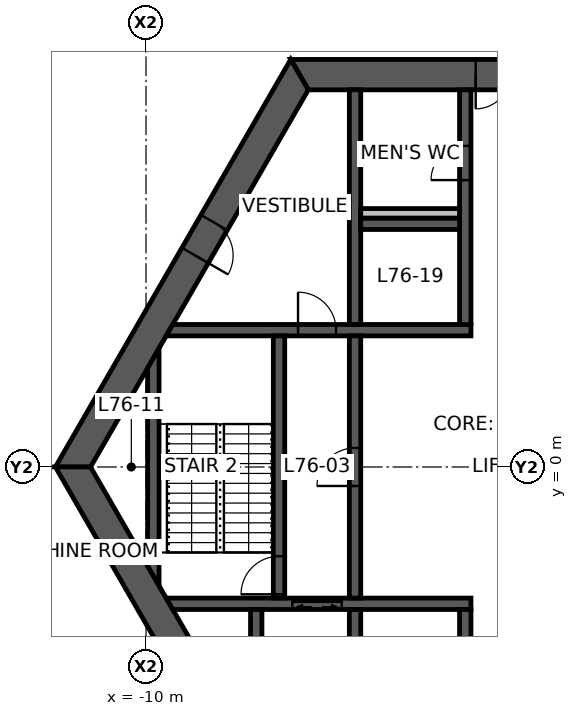
"""IFC4 building model, lengths in metres.
Left out: names, types, materials, properties, quantities, classifications, styles, units other than length and angle.
Written with IfcOpenShell. Run it as: python <this file> out.ifc"""

import sys

from ifc_helpers import new_model, si_unit, direction, frame, frame_2d, origin, place, context, subcontext, project, spatial, polyline, rectangle, outline, extrude, element, fill, save


model = new_model("IFC4")
c1 = context("Model", 3, precision=1e-05, world=origin(), true_north=direction((0.0, 1.0)))
c2 = subcontext(c1, "Body", "Model", "MODEL_VIEW")
j1 = project(units=[si_unit("LENGTHUNIT", "METRE"), si_unit("PLANEANGLEUNIT", "RADIAN")], contexts=[c1])
p1 = place(None, origin())
s1 = spatial("IfcSite", under=j1, at=p1, CompositionType="ELEMENT")
p2 = place(p1, origin())
s2 = spatial("IfcBuilding", under=s1, at=p2, CompositionType="ELEMENT")
p3 = place(p2, frame((0.0, 0.0, 302.5)))
s3 = spatial("IfcBuildingStorey", under=s2, at=p3, CompositionType="ELEMENT", Elevation=302.5)
p4 = place(p3, frame((5.961, 10.325, 0.0), z_axis=(0.0, 0.0, 1.0), x_axis=(-1.0, 0.0, 0.0)))
e1 = element("IfcWall", 1, at=p4, inside=s3, PredefinedType="SHEAR", context=c2, shape_type="SweptSolid", body=[
    extrude(outline(polyline([(-0.231, -0.4), (4.636, -0.4), (5.536, -0.4), (6.386, -0.4), (7.286, -0.4), (12.153, -0.4), (11.691, 0.4), (7.286, 0.4), (6.386, 0.4), (5.536, 0.4), (4.636, 0.4), (0.231, 0.4), (-0.231, -0.4)])), origin(), (0.0, 0.0, 1.0), 5.0),
])
p5 = place(p4, frame((6.386, 0.0, 0.0)))
e2 = element("IfcOpeningElement", 2, at=p5, cuts=e1, PredefinedType="OPENING", context=c2, shape_type="SweptSolid", body=[
    extrude(rectangle(XDim=0.9, YDim=2.1, at=frame_2d((0.45, 1.05))), frame((0.0, 0.41, 0.0), z_axis=(0.0, -1.0, 0.0), x_axis=(1.0, 0.0, 0.0)), (0.0, 0.0, 1.0), 0.82),
])
p6 = place(p4, frame((4.636, 0.0, 0.0)))
e3 = element("IfcOpeningElement", 3, at=p6, cuts=e1, PredefinedType="OPENING", context=c2, shape_type="SweptSolid", body=[
    extrude(rectangle(XDim=0.9, YDim=2.1, at=frame_2d((0.45, 1.05))), frame((0.0, 0.41, 0.0), z_axis=(0.0, -1.0, 0.0), x_axis=(1.0, 0.0, 0.0)), (0.0, 0.0, 1.0), 0.82),
])
p7 = place(p3, frame((-5.961, 10.325, 0.0), z_axis=(0.0, 0.0, 1.0), x_axis=(-0.500004296715, -0.866022923061, 0.0)))
e4 = element("IfcWall", 4, at=p7, inside=s3, PredefinedType="SHEAR", context=c2, shape_type="SweptSolid", body=[
    extrude(outline(polyline([(-0.231, -0.4), (4.494, -0.4), (5.494, -0.4), (12.153, -0.4), (11.691, 0.4), (5.494, 0.4), (4.494, 0.4), (0.231, 0.4), (-0.231, -0.4)])), origin(), (0.0, 0.0, 1.0), 5.0),
])
p8 = place(p7, frame((4.494, 0.0, 0.0)))
e5 = element("IfcOpeningElement", 5, at=p8, cuts=e4, PredefinedType="OPENING", context=c2, shape_type="SweptSolid", body=[
    extrude(rectangle(XDim=1.0, YDim=2.1, at=frame_2d((0.5, 1.05))), frame((0.0, 0.41, 0.0), z_axis=(0.0, -1.0, 0.0), x_axis=(1.0, 0.0, 0.0)), (0.0, 0.0, 1.0), 0.82),
])
p9 = place(p3, frame((-11.922, 0.0, 0.0), z_axis=(0.0, 0.0, 1.0), x_axis=(0.500004296715, -0.866022923061, 0.0)))
e6 = element("IfcWall", 6, at=p9, inside=s3, PredefinedType="SHEAR", context=c2, shape_type="SweptSolid", body=[
    extrude(outline(polyline([(-0.231, -0.4), (6.281, -0.4), (7.081, -0.4), (12.153, -0.4), (11.691, 0.4), (7.081, 0.4), (6.281, 0.4), (0.231, 0.4), (-0.231, -0.4)])), origin(), (0.0, 0.0, 1.0), 5.0),
])
p10 = place(p9, frame((6.281, 0.0, 0.0)))
e7 = element("IfcOpeningElement", 7, at=p10, cuts=e6, PredefinedType="OPENING", context=c2, shape_type="SweptSolid", body=[
    extrude(rectangle(XDim=0.8, YDim=2.1, at=frame_2d((0.4, 1.05))), frame((0.0, 0.41, 0.0), z_axis=(0.0, -1.0, 0.0), x_axis=(1.0, 0.0, 0.0)), (0.0, 0.0, 1.0), 0.82),
])
p11 = place(p3, frame((-10.396, 17.834, 0.0), z_axis=(0.0, 0.0, 1.0), x_axis=(-0.499997112899, -0.866027070647, 0.0)))
e8 = element("IfcWall", 8, at=p11, inside=s3, PredefinedType="ELEMENTEDWALL", context=c2, shape_type="SweptSolid", body=[
    extrude(rectangle(XDim=20.493, YDim=0.2, at=frame_2d((10.246, 0.0))), origin(), (0.0, 0.0, 1.0), 5.0),
])
p12 = place(p11, frame((0.9, 0.0, 0.4)))
e9 = element("IfcOpeningElement", 9, at=p12, cuts=e8, PredefinedType="OPENING", context=c2, shape_type="SweptSolid", body=[
    extrude(rectangle(XDim=2.615, YDim=4.2, at=frame_2d((1.308, 2.1))), frame((0.0, 0.11, 0.0), z_axis=(0.0, -1.0, 0.0), x_axis=(1.0, 0.0, 0.0)), (0.0, 0.0, 1.0), 0.22),
])
p13 = place(p11, frame((4.115, 0.0, 0.4)))
e10 = element("IfcOpeningElement", 10, at=p13, cuts=e8, PredefinedType="OPENING", context=c2, shape_type="SweptSolid", body=[
    extrude(rectangle(XDim=2.615, YDim=4.2, at=frame_2d((1.308, 2.1))), frame((0.0, 0.11, 0.0), z_axis=(0.0, -1.0, 0.0), x_axis=(1.0, 0.0, 0.0)), (0.0, 0.0, 1.0), 0.22),
])
p14 = place(p11, frame((13.762, 0.0, 0.4)))
e11 = element("IfcOpeningElement", 11, at=p14, cuts=e8, PredefinedType="OPENING", context=c2, shape_type="SweptSolid", body=[
    extrude(rectangle(XDim=2.615, YDim=4.2, at=frame_2d((1.308, 2.1))), frame((0.0, 0.11, 0.0), z_axis=(0.0, -1.0, 0.0), x_axis=(1.0, 0.0, 0.0)), (0.0, 0.0, 1.0), 0.22),
])
p15 = place(p11, frame((16.977, 0.0, 0.4)))
e12 = element("IfcOpeningElement", 12, at=p15, cuts=e8, PredefinedType="OPENING", context=c2, shape_type="SweptSolid", body=[
    extrude(rectangle(XDim=2.615, YDim=4.2, at=frame_2d((1.308, 2.1))), frame((0.0, 0.11, 0.0), z_axis=(0.0, -1.0, 0.0), x_axis=(1.0, 0.0, 0.0)), (0.0, 0.0, 1.0), 0.22),
])
p16 = place(p3, frame((-20.643, -0.087, 0.0), z_axis=(0.0, 0.0, 1.0), x_axis=(0.499997112899, -0.866027070647, 0.0)))
e13 = element("IfcWall", 13, at=p16, inside=s3, PredefinedType="ELEMENTEDWALL", context=c2, shape_type="SweptSolid", body=[
    extrude(rectangle(XDim=20.493, YDim=0.2, at=frame_2d((10.246, 0.0))), origin(), (0.0, 0.0, 1.0), 5.0),
])
p17 = place(p16, frame((0.9, 0.0, 0.4)))
e14 = element("IfcOpeningElement", 14, at=p17, cuts=e13, PredefinedType="OPENING", context=c2, shape_type="SweptSolid", body=[
    extrude(rectangle(XDim=2.615, YDim=4.2, at=frame_2d((1.308, 2.1))), frame((0.0, 0.11, 0.0), z_axis=(0.0, -1.0, 0.0), x_axis=(1.0, 0.0, 0.0)), (0.0, 0.0, 1.0), 0.22),
])
p18 = place(p16, frame((4.115, 0.0, 0.4)))
e15 = element("IfcOpeningElement", 15, at=p18, cuts=e13, PredefinedType="OPENING", context=c2, shape_type="SweptSolid", body=[
    extrude(rectangle(XDim=2.615, YDim=4.2, at=frame_2d((1.308, 2.1))), frame((0.0, 0.11, 0.0), z_axis=(0.0, -1.0, 0.0), x_axis=(1.0, 0.0, 0.0)), (0.0, 0.0, 1.0), 0.22),
])
p19 = place(p16, frame((7.331, 0.0, 0.4)))
e16 = element("IfcOpeningElement", 16, at=p19, cuts=e13, PredefinedType="OPENING", context=c2, shape_type="SweptSolid", body=[
    extrude(rectangle(XDim=2.615, YDim=4.2, at=frame_2d((1.308, 2.1))), frame((0.0, 0.11, 0.0), z_axis=(0.0, -1.0, 0.0), x_axis=(1.0, 0.0, 0.0)), (0.0, 0.0, 1.0), 0.22),
])
p20 = place(p16, frame((10.546, 0.0, 0.4)))
e17 = element("IfcOpeningElement", 17, at=p20, cuts=e13, PredefinedType="OPENING", context=c2, shape_type="SweptSolid", body=[
    extrude(rectangle(XDim=2.615, YDim=4.2, at=frame_2d((1.308, 2.1))), frame((0.0, 0.11, 0.0), z_axis=(0.0, -1.0, 0.0), x_axis=(1.0, 0.0, 0.0)), (0.0, 0.0, 1.0), 0.22),
])
p21 = place(p16, frame((13.762, 0.0, 0.4)))
e18 = element("IfcOpeningElement", 18, at=p21, cuts=e13, PredefinedType="OPENING", context=c2, shape_type="SweptSolid", body=[
    extrude(rectangle(XDim=2.615, YDim=4.2, at=frame_2d((1.308, 2.1))), frame((0.0, 0.11, 0.0), z_axis=(0.0, -1.0, 0.0), x_axis=(1.0, 0.0, 0.0)), (0.0, 0.0, 1.0), 0.22),
])
p22 = place(p16, frame((16.977, 0.0, 0.4)))
e19 = element("IfcOpeningElement", 19, at=p22, cuts=e13, PredefinedType="OPENING", context=c2, shape_type="SweptSolid", body=[
    extrude(rectangle(XDim=2.615, YDim=4.2, at=frame_2d((1.308, 2.1))), frame((0.0, 0.11, 0.0), z_axis=(0.0, -1.0, 0.0), x_axis=(1.0, 0.0, 0.0)), (0.0, 0.0, 1.0), 0.22),
])
p23 = place(p3, frame((-9.382, 3.6, 0.0), z_axis=(0.0, 0.0, 1.0), x_axis=(1.0, 0.0, 0.0)))
e20 = element("IfcWall", 20, at=p23, inside=s3, PredefinedType="SHEAR", context=c2, shape_type="SweptSolid", body=[
    extrude(outline(polyline([(-0.087, -0.15), (3.382, -0.15), (4.382, -0.15), (7.932, -0.15), (7.932, 0.15), (4.382, 0.15), (3.382, 0.15), (0.087, 0.15), (-0.087, -0.15)])), origin(), (0.0, 0.0, 1.0), 5.0),
])
p24 = place(p23, frame((3.382, 0.0, 0.0)))
e21 = element("IfcOpeningElement", 21, at=p24, cuts=e20, PredefinedType="OPENING", context=c2, shape_type="SweptSolid", body=[
    extrude(rectangle(XDim=1.0, YDim=2.1, at=frame_2d((0.5, 1.05))), frame((0.0, 0.16, 0.0), z_axis=(0.0, -1.0, 0.0), x_axis=(1.0, 0.0, 0.0)), (0.0, 0.0, 1.0), 0.32),
])
p25 = place(p3, frame((-9.382, -3.6, 0.0), z_axis=(0.0, 0.0, 1.0), x_axis=(1.0, 0.0, 0.0)))
e22 = element("IfcWall", 22, at=p25, inside=s3, PredefinedType="SHEAR", context=c2, shape_type="SweptSolid", body=[
    extrude(outline(polyline([(0.087, -0.15), (3.232, -0.15), (4.532, -0.15), (7.932, -0.15), (7.932, 0.15), (4.532, 0.15), (3.232, 0.15), (-0.087, 0.15), (0.087, -0.15)])), origin(), (0.0, 0.0, 1.0), 5.0),
])
p26 = place(p25, frame((3.232, 0.0, 0.0)))
e23 = element("IfcOpeningElement", 23, at=p26, cuts=e22, PredefinedType="OPENING", context=c2, shape_type="SweptSolid", body=[
    extrude(rectangle(XDim=1.3, YDim=2.1, at=frame_2d((0.65, 1.05))), frame((0.0, 0.16, 0.0), z_axis=(0.0, -1.0, 0.0), x_axis=(1.0, 0.0, 0.0)), (0.0, 0.0, 1.0), 0.32),
])
p27 = place(p3, frame((-1.6, 3.75, 0.0), z_axis=(0.0, 0.0, 1.0), x_axis=(0.0, 1.0, 0.0)))
e24 = element("IfcWall", 24, at=p27, inside=s3, PredefinedType="SHEAR", context=c2, shape_type="SweptSolid", body=[
    extrude(rectangle(XDim=6.175, YDim=0.3, at=frame_2d((3.087, 0.0))), origin(), (0.0, 0.0, 1.0), 5.0),
])
p28 = place(p27, frame((3.8, 0.0, 0.0)))
e25 = element("IfcOpeningElement", 25, at=p28, cuts=e24, PredefinedType="OPENING", context=c2, shape_type="SweptSolid", body=[
    extrude(rectangle(XDim=0.9, YDim=2.1, at=frame_2d((0.45, 1.05))), frame((0.0, 0.16, 0.0), z_axis=(0.0, -1.0, 0.0), x_axis=(1.0, 0.0, 0.0)), (0.0, 0.0, 1.0), 0.32),
])
p29 = place(p3, frame((-1.6, -3.75, 0.0), z_axis=(0.0, 0.0, 1.0), x_axis=(0.0, -1.0, 0.0)))
e26 = element("IfcWall", 26, at=p29, inside=s3, PredefinedType="SHEAR", context=c2, shape_type="SweptSolid", body=[
    extrude(rectangle(XDim=6.175, YDim=0.3, at=frame_2d((3.087, 0.0))), origin(), (0.0, 0.0, 1.0), 5.0),
])
p30 = place(p29, frame((3.8, 0.0, 0.0)))
e27 = element("IfcOpeningElement", 27, at=p30, cuts=e26, PredefinedType="OPENING", context=c2, shape_type="SweptSolid", body=[
    extrude(rectangle(XDim=0.9, YDim=2.1, at=frame_2d((0.45, 1.05))), frame((0.0, 0.16, 0.0), z_axis=(0.0, -1.0, 0.0), x_axis=(1.0, 0.0, 0.0)), (0.0, 0.0, 1.0), 0.32),
])
p31 = place(p3, frame((-4.5, -3.45, 0.0), z_axis=(0.0, 0.0, 1.0), x_axis=(0.0, 1.0, 0.0)))
e28 = element("IfcWall", 28, at=p31, inside=s3, PredefinedType="SHEAR", context=c2, shape_type="SweptSolid", body=[
    extrude(rectangle(XDim=6.9, YDim=0.3, at=frame_2d((3.45, 0.0))), origin(), (0.0, 0.0, 1.0), 5.0),
])
p32 = place(p31, frame((2.95, 0.0, 0.0)))
e29 = element("IfcOpeningElement", 29, at=p32, cuts=e28, PredefinedType="OPENING", context=c2, shape_type="SweptSolid", body=[
    extrude(rectangle(XDim=1.0, YDim=2.1, at=frame_2d((0.5, 1.05))), frame((0.0, 0.16, 0.0), z_axis=(0.0, -1.0, 0.0), x_axis=(1.0, 0.0, 0.0)), (0.0, 0.0, 1.0), 0.32),
])
p33 = place(p3, frame((-6.5, -3.45, 0.0), z_axis=(0.0, 0.0, 1.0), x_axis=(0.0, 1.0, 0.0)))
e30 = element("IfcWall", 30, at=p33, inside=s3, PredefinedType="SHEAR", context=c2, shape_type="SweptSolid", body=[
    extrude(rectangle(XDim=6.9, YDim=0.3, at=frame_2d((3.45, 0.0))), origin(), (0.0, 0.0, 1.0), 5.0),
])
p34 = place(p33, frame((0.1, 0.0, 0.0)))
e31 = element("IfcOpeningElement", 31, at=p34, cuts=e30, PredefinedType="OPENING", context=c2, shape_type="SweptSolid", body=[
    extrude(rectangle(XDim=1.0, YDim=2.1, at=frame_2d((0.5, 1.05))), frame((0.0, 0.16, 0.0), z_axis=(0.0, -1.0, 0.0), x_axis=(1.0, 0.0, 0.0)), (0.0, 0.0, 1.0), 0.32),
])
for number, where, z_axis, x_axis in (
    (32, (-4.5, 3.75, 0.0), (0.0, 0.0, 1.0), (0.0, 1.0, 0.0)),
    (33, (-4.5, -3.75, 0.0), (0.0, 0.0, 1.0), (0.0, -1.0, 0.0)),
):
    element("IfcWall", number, at=place(p3, frame(where, z_axis=z_axis, x_axis=x_axis)), inside=s3, PredefinedType="SHEAR", context=c2, shape_type="SweptSolid", body=[
        extrude(rectangle(XDim=6.175, YDim=0.3, at=frame_2d((3.087, 0.0))), origin(), (0.0, 0.0, 1.0), 5.0),
    ])
p35 = place(p3, frame((-4.35, 6.4, 0.0), z_axis=(0.0, 0.0, 1.0), x_axis=(1.0, 0.0, 0.0)))
e34 = element("IfcWall", 34, at=p35, inside=s3, PredefinedType="SHEAR", context=c2, shape_type="SweptSolid", body=[
    extrude(rectangle(XDim=2.6, YDim=0.3, at=frame_2d((1.3, 0.0))), origin(), (0.0, 0.0, 1.0), 5.0),
])
p36 = place(p3, frame((-7.1, -3.75, 0.0), z_axis=(0.0, 0.0, 1.0), x_axis=(0.0, -1.0, 0.0)))
e35 = element("IfcWall", 35, at=p36, inside=s3, PredefinedType="SHEAR", context=c2, shape_type="SweptSolid", body=[
    extrude(rectangle(XDim=3.1, YDim=0.3, at=frame_2d((1.55, 0.0))), origin(), (0.0, 0.0, 1.0), 5.0),
])
p37 = place(p3, frame((-9.808, -2.862, 0.0), z_axis=(0.0, 0.0, 1.0), x_axis=(0.0, 1.0, 0.0)))
e36 = element("IfcWall", 36, at=p37, inside=s3, PredefinedType="SHEAR", context=c2, shape_type="SweptSolid", body=[
    extrude(outline(polyline([(-0.26, -0.15), (5.984, -0.15), (5.465, 0.15), (0.26, 0.15), (-0.26, -0.15)])), origin(), (0.0, 0.0, 1.0), 5.0),
])
p38 = place(p3, frame((-4.35, 6.675, 0.0), z_axis=(0.0, 0.0, 1.0), x_axis=(1.0, 0.0, 0.0)))
e37 = element("IfcWall", 37, at=p38, inside=s3, PredefinedType="PLUMBINGWALL", context=c2, shape_type="SweptSolid", body=[
    extrude(rectangle(XDim=2.6, YDim=0.25, at=frame_2d((1.3, 0.0))), origin(), (0.0, 0.0, 1.0), 5.0),
])
p39 = place(p3, frame((-6.5, -3.75, 5.0), z_axis=(0.0, 0.0, 1.0), x_axis=(0.0, 1.0, 0.0)))
e38 = element("IfcWall", 38, at=p39, inside=s3, PredefinedType="STANDARD", context=c2, shape_type="SweptSolid", body=[
    extrude(rectangle(XDim=7.5, YDim=0.3, at=frame_2d((3.75, 0.0))), origin(), (0.0, 0.0, 1.0), 2.45),
])
p40 = place(p39, frame((0.45, 0.0, 0.0)))
e39 = element("IfcOpeningElement", 39, at=p40, cuts=e38, PredefinedType="OPENING", context=c2, shape_type="SweptSolid", body=[
    extrude(rectangle(XDim=0.9, YDim=2.1, at=frame_2d((0.45, 1.05))), frame((0.0, 0.16, 0.0), z_axis=(0.0, -1.0, 0.0), x_axis=(1.0, 0.0, 0.0)), (0.0, 0.0, 1.0), 0.32),
])
for number, where, z_axis, x_axis in (
    (40, (-6.65, -3.6, 5.0), (0.0, 0.0, 1.0), (-1.0, 0.0, 0.0)),
    (41, (-6.65, 3.6, 5.0), (0.0, 0.0, 1.0), (-1.0, 0.0, 0.0)),
):
    element("IfcWall", number, at=place(p3, frame(where, z_axis=z_axis, x_axis=x_axis)), inside=s3, PredefinedType="STANDARD", context=c2, shape_type="SweptSolid", body=[
        extrude(rectangle(XDim=3.008, YDim=0.3, at=frame_2d((1.504, 0.0))), origin(), (0.0, 0.0, 1.0), 2.45),
    ])
p41 = place(p3, frame((-9.808, -3.75, 5.0), z_axis=(0.0, 0.0, 1.0), x_axis=(0.0, 1.0, 0.0)))
e42 = element("IfcWall", 42, at=p41, inside=s3, PredefinedType="STANDARD", context=c2, shape_type="SweptSolid", body=[
    extrude(rectangle(XDim=7.5, YDim=0.3, at=frame_2d((3.75, 0.0))), origin(), (0.0, 0.0, 1.0), 2.45),
])
p42 = place(p5, origin())
e43 = element("IfcDoor", 43, at=p42, inside=s3, OperationType="SINGLE_SWING_RIGHT", PredefinedType="DOOR", context=c2, shape_type="SweptSolid", body=[
    extrude(rectangle(XDim=0.9, YDim=2.1, at=frame_2d((0.45, 1.05))), frame((0.0, 0.025, 0.0), z_axis=(0.0, -1.0, 0.0), x_axis=(1.0, 0.0, 0.0)), (0.0, 0.0, 1.0), 0.05),
])
fill(e2, e43)
p43 = place(p8, origin())
e44 = element("IfcDoor", 44, at=p43, inside=s3, OperationType="SINGLE_SWING_RIGHT", PredefinedType="DOOR", context=c2, shape_type="SweptSolid", body=[
    extrude(rectangle(XDim=1.0, YDim=2.1, at=frame_2d((0.5, 1.05))), frame((0.0, 0.025, 0.0), z_axis=(0.0, -1.0, 0.0), x_axis=(1.0, 0.0, 0.0)), (0.0, 0.0, 1.0), 0.05),
])
fill(e5, e44)
p44 = place(p32, origin())
e45 = element("IfcDoor", 45, at=p44, inside=s3, OperationType="SINGLE_SWING_LEFT", PredefinedType="DOOR", context=c2, shape_type="SweptSolid", body=[
    extrude(rectangle(XDim=1.0, YDim=2.1, at=frame_2d((0.5, 1.05))), frame((0.0, 0.025, 0.0), z_axis=(0.0, -1.0, 0.0), x_axis=(1.0, 0.0, 0.0)), (0.0, 0.0, 1.0), 0.05),
])
fill(e29, e45)
p45 = place(p34, origin())
e46 = element("IfcDoor", 46, at=p45, inside=s3, OperationType="SINGLE_SWING_LEFT", PredefinedType="DOOR", context=c2, shape_type="SweptSolid", body=[
    extrude(rectangle(XDim=1.0, YDim=2.1, at=frame_2d((0.5, 1.05))), frame((0.0, 0.025, 0.0), z_axis=(0.0, -1.0, 0.0), x_axis=(1.0, 0.0, 0.0)), (0.0, 0.0, 1.0), 0.05),
])
fill(e31, e46)
p46 = place(p24, origin())
e47 = element("IfcDoor", 47, at=p46, inside=s3, OperationType="SINGLE_SWING_LEFT", PredefinedType="DOOR", context=c2, shape_type="SweptSolid", body=[
    extrude(rectangle(XDim=1.0, YDim=2.1, at=frame_2d((0.5, 1.05))), frame((0.0, 0.025, 0.0), z_axis=(0.0, -1.0, 0.0), x_axis=(1.0, 0.0, 0.0)), (0.0, 0.0, 1.0), 0.05),
])
fill(e21, e47)
p47 = place(p28, origin())
e48 = element("IfcDoor", 48, at=p47, inside=s3, OperationType="SINGLE_SWING_LEFT", PredefinedType="DOOR", context=c2, shape_type="SweptSolid", body=[
    extrude(rectangle(XDim=0.9, YDim=2.1, at=frame_2d((0.45, 1.05))), frame((0.0, 0.025, 0.0), z_axis=(0.0, -1.0, 0.0), x_axis=(1.0, 0.0, 0.0)), (0.0, 0.0, 1.0), 0.05),
])
fill(e25, e48)
p48 = place(p26, origin())
e49 = element("IfcDoor", 49, at=p48, inside=s3, OperationType="DOUBLE_DOOR_SLIDING", PredefinedType="DOOR", context=c2, shape_type="SweptSolid", body=[
    extrude(rectangle(XDim=1.3, YDim=2.1, at=frame_2d((0.65, 1.05))), frame((0.0, 0.025, 0.0), z_axis=(0.0, -1.0, 0.0), x_axis=(1.0, 0.0, 0.0)), (0.0, 0.0, 1.0), 0.05),
])
fill(e23, e49)
p49 = place(p40, origin())
e50 = element("IfcDoor", 50, at=p49, inside=s3, OperationType="SINGLE_SWING_LEFT", PredefinedType="DOOR", context=c2, shape_type="SweptSolid", body=[
    extrude(rectangle(XDim=0.9, YDim=2.1, at=frame_2d((0.45, 1.05))), frame((0.0, 0.025, 0.0), z_axis=(0.0, -1.0, 0.0), x_axis=(1.0, 0.0, 0.0)), (0.0, 0.0, 1.0), 0.05),
])
fill(e39, e50)
save(model, sys.argv[1])
